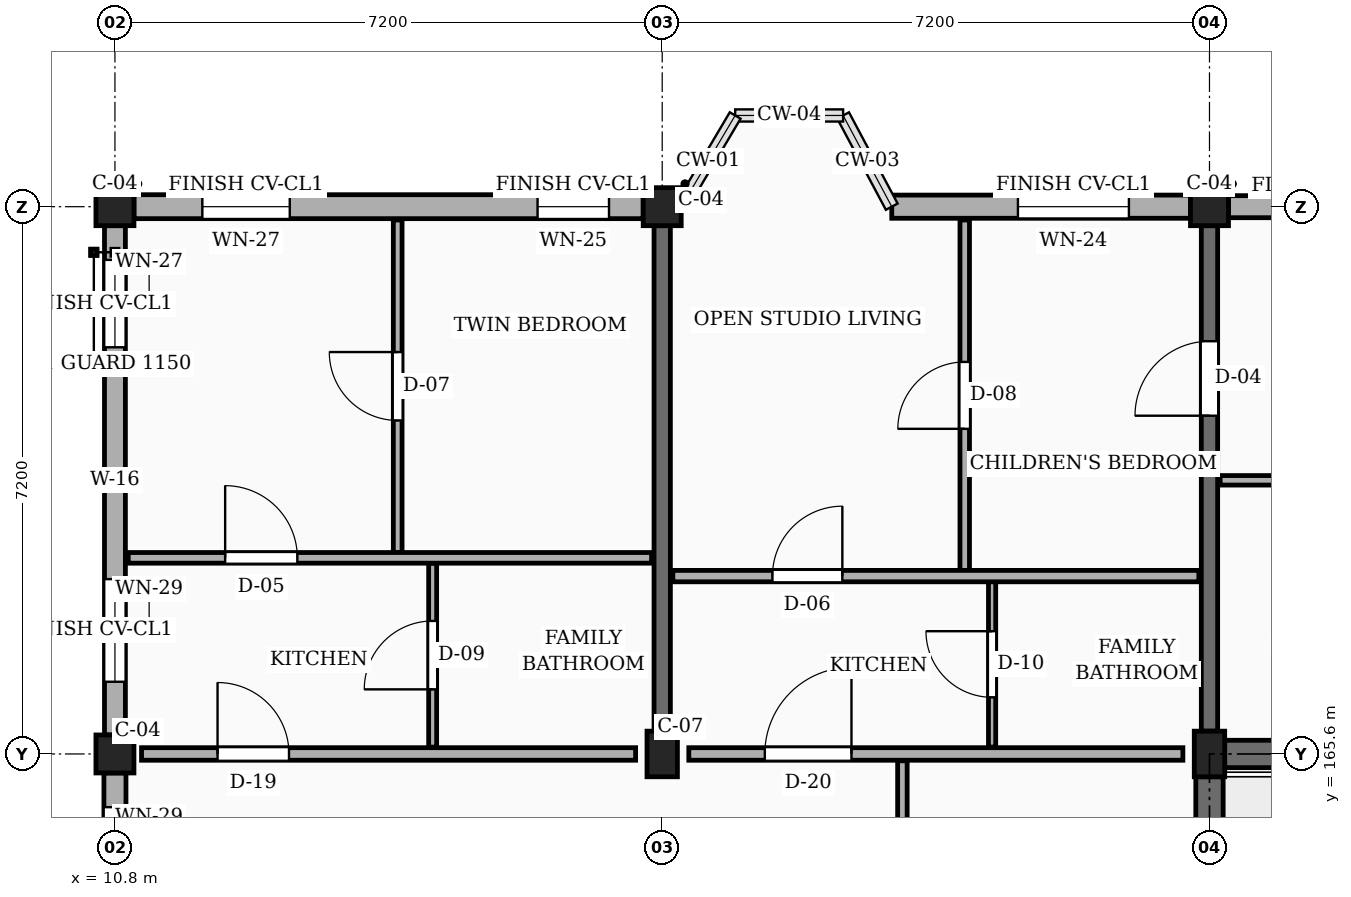
"""IFC4 building model, lengths in metres.
Left out: names, types, materials, properties, quantities, classifications, styles, units other than length and angle.
Written with IfcOpenShell. Run it as: python <this file> out.ifc"""

import sys

from ifc_helpers import new_model, si_unit, direction, frame, frame_2d, origin, origin_2d, place, context, subcontext, project, spatial, rectangle, extrude, element, fill, save


model = new_model("IFC4")
c1 = context("Model", 3, precision=1e-05, world=origin(), true_north=direction((0.0, 1.0)))
c2 = subcontext(c1, "Body", "Model", "MODEL_VIEW")
j1 = project(units=[si_unit("LENGTHUNIT", "METRE"), si_unit("PLANEANGLEUNIT", "RADIAN")], contexts=[c1])
p1 = place(None, origin())
s1 = spatial("IfcSite", under=j1, at=p1, CompositionType="ELEMENT")
p2 = place(p1, origin())
s2 = spatial("IfcBuilding", under=s1, at=p2, CompositionType="ELEMENT")
p3 = place(p2, frame((0.0, 0.0, 26.55)))
s3 = spatial("IfcBuildingStorey", under=s2, at=p3, CompositionType="ELEMENT", Elevation=26.55)
for number, where, z_axis, x_axis in (
    (1, (10.8, 165.6, 0.0), (0.0, 0.0, 1.0), (1.0, 0.0, 0.0)),
    (2, (10.8, 172.8, 0.0), (0.0, 0.0, 1.0), (1.0, 0.0, 0.0)),
):
    element("IfcColumn", number, at=place(p3, frame(where, z_axis=z_axis, x_axis=x_axis)), inside=s3, PredefinedType="COLUMN", context=c2, shape_type="SweptSolid", body=[
        extrude(rectangle(XDim=0.5, YDim=0.5, at=origin_2d()), origin(), (0.0, 0.0, 1.0), 3.15),
    ])
p4 = place(p3, frame((18.0, 165.6, 0.0), z_axis=(0.0, 0.0, 1.0), x_axis=(1.0, 0.0, 0.0)))
e3 = element("IfcColumn", 3, at=p4, inside=s3, PredefinedType="COLUMN", context=c2, shape_type="SweptSolid", body=[
    extrude(rectangle(XDim=0.4, YDim=0.6, at=origin_2d()), origin(), (0.0, 0.0, 1.0), 3.15),
])
p5 = place(p3, frame((18.0, 172.8, 0.0), z_axis=(0.0, 0.0, 1.0), x_axis=(1.0, 0.0, 0.0)))
e4 = element("IfcColumn", 4, at=p5, inside=s3, PredefinedType="COLUMN", context=c2, shape_type="SweptSolid", body=[
    extrude(rectangle(XDim=0.5, YDim=0.5, at=origin_2d()), origin(), (0.0, 0.0, 1.0), 3.15),
])
p6 = place(p3, frame((25.2, 165.6, 0.0), z_axis=(0.0, 0.0, 1.0), x_axis=(1.0, 0.0, 0.0)))
e5 = element("IfcColumn", 5, at=p6, inside=s3, PredefinedType="COLUMN", context=c2, shape_type="SweptSolid", body=[
    extrude(rectangle(XDim=0.4, YDim=0.6, at=origin_2d()), origin(), (0.0, 0.0, 1.0), 3.15),
])
p7 = place(p3, frame((25.2, 172.8, 0.0), z_axis=(0.0, 0.0, 1.0), x_axis=(1.0, 0.0, 0.0)))
e6 = element("IfcColumn", 6, at=p7, inside=s3, PredefinedType="COLUMN", context=c2, shape_type="SweptSolid", body=[
    extrude(rectangle(XDim=0.5, YDim=0.5, at=origin_2d()), origin(), (0.0, 0.0, 1.0), 3.15),
])
p8 = place(p3, frame((18.0, 165.9, 0.0), z_axis=(0.0, 0.0, 1.0), x_axis=(0.0, 1.0, 0.0)))
e7 = element("IfcWall", 7, at=p8, inside=s3, PredefinedType="SOLIDWALL", context=c2, shape_type="SweptSolid", body=[
    extrude(rectangle(XDim=6.65, YDim=0.215, at=frame_2d((3.325, 0.0))), origin(), (0.0, 0.0, 1.0), 2.185),
])
p9 = place(p3, frame((25.2, 165.9, 0.0), z_axis=(0.0, 0.0, 1.0), x_axis=(0.0, 1.0, 0.0)))
e8 = element("IfcWall", 8, at=p9, inside=s3, PredefinedType="SOLIDWALL", context=c2, shape_type="SweptSolid", body=[
    extrude(rectangle(XDim=6.65, YDim=0.215, at=frame_2d((3.325, 0.0))), origin(), (0.0, 0.0, 1.0), 2.185),
])
p10 = place(p9, frame((4.15, 0.0, 0.0)))
e9 = element("IfcOpeningElement", 9, at=p10, cuts=e8, PredefinedType="OPENING", context=c2, shape_type="SweptSolid", body=[
    extrude(rectangle(XDim=0.98, YDim=2.12, at=frame_2d((0.49, 1.06))), frame((0.0, 0.118, 0.0), z_axis=(0.0, -1.0, 0.0), x_axis=(1.0, 0.0, 0.0)), (0.0, 0.0, 1.0), 0.235),
])
p11 = place(p3, frame((32.15, 172.8, 0.0), z_axis=(0.0, 0.0, 1.0), x_axis=(-1.0, 0.0, 0.0)))
e10 = element("IfcWall", 10, at=p11, inside=s3, PredefinedType="SOLIDWALL", context=c2, shape_type="SweptSolid", body=[
    extrude(rectangle(XDim=6.7, YDim=0.29, at=frame_2d((3.35, 0.0))), origin(), (0.0, 0.0, 1.0), 2.455),
])
p12 = place(p11, frame((0.45, 0.0, 0.78)))
e11 = element("IfcOpeningElement", 11, at=p12, cuts=e10, PredefinedType="OPENING", context=c2, shape_type="SweptSolid", body=[
    extrude(rectangle(XDim=1.3, YDim=1.36, at=frame_2d((0.65, 0.68))), frame((0.0, 0.155, 0.0), z_axis=(0.0, -1.0, 0.0), x_axis=(1.0, 0.0, 0.0)), (0.0, 0.0, 1.0), 0.31),
])
p13 = place(p11, frame((4.65, 0.0, 0.78)))
e12 = element("IfcOpeningElement", 12, at=p13, cuts=e10, PredefinedType="OPENING", context=c2, shape_type="SweptSolid", body=[
    extrude(rectangle(XDim=1.46, YDim=1.36, at=frame_2d((0.73, 0.68))), frame((0.0, 0.155, 0.0), z_axis=(0.0, -1.0, 0.0), x_axis=(1.0, 0.0, 0.0)), (0.0, 0.0, 1.0), 0.31),
])
p14 = place(p3, frame((24.95, 172.8, 0.0), z_axis=(0.0, 0.0, 1.0), x_axis=(-1.0, 0.0, 0.0)))
e13 = element("IfcWall", 13, at=p14, inside=s3, PredefinedType="SOLIDWALL", context=c2, shape_type="SweptSolid", body=[
    extrude(rectangle(XDim=3.93, YDim=0.305, at=frame_2d((1.965, 0.0))), origin(), (0.0, 0.0, 1.0), 2.455),
])
p15 = place(p14, frame((0.81, 0.0, 0.78)))
e14 = element("IfcOpeningElement", 14, at=p15, cuts=e13, PredefinedType="OPENING", context=c2, shape_type="SweptSolid", body=[
    extrude(rectangle(XDim=1.46, YDim=1.36, at=frame_2d((0.73, 0.68))), frame((0.0, 0.163, 0.0), z_axis=(0.0, -1.0, 0.0), x_axis=(1.0, 0.0, 0.0)), (0.0, 0.0, 1.0), 0.325),
])
p16 = place(p3, frame((17.75, 172.8, 0.0), z_axis=(0.0, 0.0, 1.0), x_axis=(-1.0, 0.0, 0.0)))
e15 = element("IfcWall", 15, at=p16, inside=s3, PredefinedType="SOLIDWALL", context=c2, shape_type="SweptSolid", body=[
    extrude(rectangle(XDim=6.7, YDim=0.315, at=frame_2d((3.35, 0.0))), origin(), (0.0, 0.0, 1.0), 2.455),
])
p17 = place(p16, frame((0.45, 0.0, 0.78)))
e16 = element("IfcOpeningElement", 16, at=p17, cuts=e15, PredefinedType="OPENING", context=c2, shape_type="SweptSolid", body=[
    extrude(rectangle(XDim=0.94, YDim=1.44, at=frame_2d((0.47, 0.72))), frame((0.0, 0.167, 0.0), z_axis=(0.0, -1.0, 0.0), x_axis=(1.0, 0.0, 0.0)), (0.0, 0.0, 1.0), 0.335),
])
p18 = place(p16, frame((4.65, 0.0, 0.78)))
e17 = element("IfcOpeningElement", 17, at=p18, cuts=e15, PredefinedType="OPENING", context=c2, shape_type="SweptSolid", body=[
    extrude(rectangle(XDim=1.15, YDim=1.44, at=frame_2d((0.575, 0.72))), frame((0.0, 0.167, 0.0), z_axis=(0.0, -1.0, 0.0), x_axis=(1.0, 0.0, 0.0)), (0.0, 0.0, 1.0), 0.335),
])
p19 = place(p3, frame((10.8, 172.55, 0.0), z_axis=(0.0, 0.0, 1.0), x_axis=(0.0, -1.0, 0.0)))
e18 = element("IfcWall", 18, at=p19, inside=s3, PredefinedType="SOLIDWALL", context=c2, shape_type="SweptSolid", body=[
    extrude(rectangle(XDim=6.7, YDim=0.275, at=frame_2d((3.35, 0.0))), origin(), (0.0, 0.0, 1.0), 2.455),
])
p20 = place(p19, frame((0.45, 0.0, 0.78)))
e19 = element("IfcOpeningElement", 19, at=p20, cuts=e18, PredefinedType="OPENING", context=c2, shape_type="SweptSolid", body=[
    extrude(rectangle(XDim=1.15, YDim=1.44, at=frame_2d((0.575, 0.72))), frame((0.0, 0.147, 0.0), z_axis=(0.0, -1.0, 0.0), x_axis=(1.0, 0.0, 0.0)), (0.0, 0.0, 1.0), 0.295),
])
p21 = place(p19, frame((4.65, 0.0, 0.78)))
e20 = element("IfcOpeningElement", 20, at=p21, cuts=e18, PredefinedType="OPENING", context=c2, shape_type="SweptSolid", body=[
    extrude(rectangle(XDim=1.35, YDim=1.44, at=frame_2d((0.675, 0.72))), frame((0.0, 0.147, 0.0), z_axis=(0.0, -1.0, 0.0), x_axis=(1.0, 0.0, 0.0)), (0.0, 0.0, 1.0), 0.295),
])
p22 = place(p3, frame((10.8, 165.35, 0.0), z_axis=(0.0, 0.0, 1.0), x_axis=(0.0, -1.0, 0.0)))
e21 = element("IfcWall", 21, at=p22, inside=s3, PredefinedType="SOLIDWALL", context=c2, shape_type="SweptSolid", body=[
    extrude(rectangle(XDim=6.7, YDim=0.29, at=frame_2d((3.35, 0.0))), origin(), (0.0, 0.0, 1.0), 2.455),
])
p23 = place(p22, frame((0.45, 0.0, 0.78)))
e22 = element("IfcOpeningElement", 22, at=p23, cuts=e21, PredefinedType="OPENING", context=c2, shape_type="SweptSolid", body=[
    extrude(rectangle(XDim=1.35, YDim=1.44, at=frame_2d((0.675, 0.72))), frame((0.0, 0.155, 0.0), z_axis=(0.0, -1.0, 0.0), x_axis=(1.0, 0.0, 0.0)), (0.0, 0.0, 1.0), 0.31),
])
p24 = place(p22, frame((4.65, 0.0, 0.78)))
e23 = element("IfcOpeningElement", 23, at=p24, cuts=e21, PredefinedType="OPENING", context=c2, shape_type="SweptSolid", body=[
    extrude(rectangle(XDim=0.85, YDim=1.15, at=frame_2d((0.425, 0.575))), frame((0.0, 0.155, 0.0), z_axis=(0.0, -1.0, 0.0), x_axis=(1.0, 0.0, 0.0)), (0.0, 0.0, 1.0), 0.31),
])
p25 = place(p3, frame((25.2, 158.7, 0.0), z_axis=(0.0, 0.0, 1.0), x_axis=(0.0, 1.0, 0.0)))
e24 = element("IfcWall", 24, at=p25, inside=s3, PredefinedType="SHEAR", context=c2, shape_type="SweptSolid", body=[
    extrude(rectangle(XDim=6.6, YDim=0.36, at=frame_2d((3.3, 0.0))), origin(), (0.0, 0.0, 1.0), 2.885),
])
p26 = place(p3, frame((25.4, 165.6, 0.0), z_axis=(0.0, 0.0, 1.0), x_axis=(1.0, 0.0, 0.0)))
e25 = element("IfcWall", 25, at=p26, inside=s3, PredefinedType="SHEAR", context=c2, shape_type="SweptSolid", body=[
    extrude(rectangle(XDim=6.8, YDim=0.36, at=frame_2d((3.4, 0.0))), origin(), (0.0, 0.0, 1.0), 2.885),
])
p27 = place(p3, frame((11.15, 165.6, 0.0), z_axis=(0.0, 0.0, 1.0), x_axis=(1.0, 0.0, 0.0)))
e26 = element("IfcWall", 26, at=p27, inside=s3, PredefinedType="PARTITIONING", context=c2, shape_type="SweptSolid", body=[
    extrude(rectangle(XDim=6.5, YDim=0.165, at=frame_2d((3.25, 0.0))), origin(), (0.0, 0.0, 1.0), 2.32),
])
p28 = place(p27, frame((1.0, 0.0, 0.0)))
e27 = element("IfcOpeningElement", 27, at=p28, cuts=e26, PredefinedType="OPENING", context=c2, shape_type="SweptSolid", body=[
    extrude(rectangle(XDim=0.94, YDim=2.12, at=frame_2d((0.47, 1.06))), frame((0.0, 0.093, 0.0), z_axis=(0.0, -1.0, 0.0), x_axis=(1.0, 0.0, 0.0)), (0.0, 0.0, 1.0), 0.185),
])
p29 = place(p3, frame((18.35, 165.6, 0.0), z_axis=(0.0, 0.0, 1.0), x_axis=(1.0, 0.0, 0.0)))
e28 = element("IfcWall", 28, at=p29, inside=s3, PredefinedType="PARTITIONING", context=c2, shape_type="SweptSolid", body=[
    extrude(rectangle(XDim=6.5, YDim=0.165, at=frame_2d((3.25, 0.0))), origin(), (0.0, 0.0, 1.0), 2.32),
])
p30 = place(p29, frame((1.0, 0.0, 0.0)))
e29 = element("IfcOpeningElement", 29, at=p30, cuts=e28, PredefinedType="OPENING", context=c2, shape_type="SweptSolid", body=[
    extrude(rectangle(XDim=1.14, YDim=2.18, at=frame_2d((0.57, 1.09))), frame((0.0, 0.093, 0.0), z_axis=(0.0, -1.0, 0.0), x_axis=(1.0, 0.0, 0.0)), (0.0, 0.0, 1.0), 0.185),
])
p31 = place(p3, frame((14.52, 168.25, 0.0), z_axis=(0.0, 0.0, 1.0), x_axis=(0.0, 1.0, 0.0)))
e30 = element("IfcWall", 30, at=p31, inside=s3, PredefinedType="PARTITIONING", context=c2, shape_type="SweptSolid", body=[
    extrude(rectangle(XDim=4.375, YDim=0.115, at=frame_2d((2.188, 0.0))), origin(), (0.0, 0.0, 1.0), 2.32),
])
p32 = place(p31, frame((1.738, 0.0, 0.0)))
e31 = element("IfcOpeningElement", 31, at=p32, cuts=e30, PredefinedType="OPENING", context=c2, shape_type="SweptSolid", body=[
    extrude(rectangle(XDim=0.9, YDim=2.1, at=frame_2d((0.45, 1.05))), frame((0.0, 0.067, 0.0), z_axis=(0.0, -1.0, 0.0), x_axis=(1.0, 0.0, 0.0)), (0.0, 0.0, 1.0), 0.135),
])
p33 = place(p3, frame((14.98, 165.69, 0.0), z_axis=(0.0, 0.0, 1.0), x_axis=(0.0, 1.0, 0.0)))
e32 = element("IfcWall", 32, at=p33, inside=s3, PredefinedType="PARTITIONING", context=c2, shape_type="SweptSolid", body=[
    extrude(rectangle(XDim=2.42, YDim=0.105, at=frame_2d((1.21, 0.0))), origin(), (0.0, 0.0, 1.0), 2.32),
])
p34 = place(p33, frame((0.76, 0.0, 0.0)))
e33 = element("IfcOpeningElement", 33, at=p34, cuts=e32, PredefinedType="OPENING", context=c2, shape_type="SweptSolid", body=[
    extrude(rectangle(XDim=0.9, YDim=2.05, at=frame_2d((0.45, 1.025))), frame((0.0, 0.062, 0.0), z_axis=(0.0, -1.0, 0.0), x_axis=(1.0, 0.0, 0.0)), (0.0, 0.0, 1.0), 0.125),
])
p35 = place(p3, frame((10.975, 168.18, 0.0), z_axis=(0.0, 0.0, 1.0), x_axis=(1.0, 0.0, 0.0)))
e34 = element("IfcWall", 34, at=p35, inside=s3, PredefinedType="PARTITIONING", context=c2, shape_type="SweptSolid", body=[
    extrude(rectangle(XDim=6.885, YDim=0.14, at=frame_2d((3.442, 0.0))), origin(), (0.0, 0.0, 1.0), 2.32),
])
p36 = place(p35, frame((1.275, 0.0, 0.0)))
e35 = element("IfcOpeningElement", 35, at=p36, cuts=e34, PredefinedType="OPENING", context=c2, shape_type="SweptSolid", body=[
    extrude(rectangle(XDim=0.95, YDim=2.1, at=frame_2d((0.475, 1.05))), frame((0.0, 0.08, 0.0), z_axis=(0.0, -1.0, 0.0), x_axis=(1.0, 0.0, 0.0)), (0.0, 0.0, 1.0), 0.16),
])
p37 = place(p3, frame((21.16, 158.49, 0.0), z_axis=(0.0, 0.0, 1.0), x_axis=(0.0, 1.0, 0.0)))
e36 = element("IfcWall", 36, at=p37, inside=s3, PredefinedType="PARTITIONING", context=c2, shape_type="SweptSolid", body=[
    extrude(rectangle(XDim=7.02, YDim=0.125, at=frame_2d((3.51, 0.0))), origin(), (0.0, 0.0, 1.0), 2.32),
])
p38 = place(p37, frame((2.85, 0.0, 0.0)))
e37 = element("IfcOpeningElement", 37, at=p38, cuts=e36, PredefinedType="OPENING", context=c2, shape_type="SweptSolid", body=[
    extrude(rectangle(XDim=1.02, YDim=2.15, at=frame_2d((0.51, 1.075))), frame((0.0, 0.073, 0.0), z_axis=(0.0, -1.0, 0.0), x_axis=(1.0, 0.0, 0.0)), (0.0, 0.0, 1.0), 0.145),
])
p39 = place(p3, frame((21.98, 168.01, 0.0), z_axis=(0.0, 0.0, 1.0), x_axis=(0.0, 1.0, 0.0)))
e38 = element("IfcWall", 38, at=p39, inside=s3, PredefinedType="PARTITIONING", context=c2, shape_type="SweptSolid", body=[
    extrude(rectangle(XDim=4.615, YDim=0.125, at=frame_2d((2.308, 0.0))), origin(), (0.0, 0.0, 1.0), 2.32),
])
p40 = place(p39, frame((1.867, 0.0, 0.0)))
e39 = element("IfcOpeningElement", 39, at=p40, cuts=e38, PredefinedType="OPENING", context=c2, shape_type="SweptSolid", body=[
    extrude(rectangle(XDim=0.88, YDim=2.08, at=frame_2d((0.44, 1.04))), frame((0.0, 0.073, 0.0), z_axis=(0.0, -1.0, 0.0), x_axis=(1.0, 0.0, 0.0)), (0.0, 0.0, 1.0), 0.145),
])
p41 = place(p3, frame((22.34, 165.69, 0.0), z_axis=(0.0, 0.0, 1.0), x_axis=(0.0, 1.0, 0.0)))
e40 = element("IfcWall", 40, at=p41, inside=s3, PredefinedType="PARTITIONING", context=c2, shape_type="SweptSolid", body=[
    extrude(rectangle(XDim=2.18, YDim=0.095, at=frame_2d((1.09, 0.0))), origin(), (0.0, 0.0, 1.0), 2.32),
])
p42 = place(p41, frame((0.655, 0.0, 0.0)))
e41 = element("IfcOpeningElement", 41, at=p42, cuts=e40, PredefinedType="OPENING", context=c2, shape_type="SweptSolid", body=[
    extrude(rectangle(XDim=0.87, YDim=2.05, at=frame_2d((0.435, 1.025))), frame((0.0, 0.058, 0.0), z_axis=(0.0, -1.0, 0.0), x_axis=(1.0, 0.0, 0.0)), (0.0, 0.0, 1.0), 0.115),
])
p43 = place(p3, frame((18.14, 167.94, 0.0), z_axis=(0.0, 0.0, 1.0), x_axis=(1.0, 0.0, 0.0)))
e42 = element("IfcWall", 42, at=p43, inside=s3, PredefinedType="PARTITIONING", context=c2, shape_type="SweptSolid", body=[
    extrude(rectangle(XDim=6.92, YDim=0.15, at=frame_2d((3.46, 0.0))), origin(), (0.0, 0.0, 1.0), 2.32),
])
p44 = place(p43, frame((1.31, 0.0, 0.0)))
e43 = element("IfcOpeningElement", 43, at=p44, cuts=e42, PredefinedType="OPENING", context=c2, shape_type="SweptSolid", body=[
    extrude(rectangle(XDim=0.92, YDim=2.1, at=frame_2d((0.46, 1.05))), frame((0.0, 0.085, 0.0), z_axis=(0.0, -1.0, 0.0), x_axis=(1.0, 0.0, 0.0)), (0.0, 0.0, 1.0), 0.17),
])
p45 = place(p3, frame((25.34, 169.2, 0.0), z_axis=(0.0, 0.0, 1.0), x_axis=(1.0, 0.0, 0.0)))
e44 = element("IfcWall", 44, at=p45, inside=s3, PredefinedType="PARTITIONING", context=c2, shape_type="SweptSolid", body=[
    extrude(rectangle(XDim=6.92, YDim=0.125, at=frame_2d((3.46, 0.0))), origin(), (0.0, 0.0, 1.0), 2.32),
])
p46 = place(p45, frame((1.05, 0.0, 0.0)))
e45 = element("IfcOpeningElement", 45, at=p46, cuts=e44, PredefinedType="OPENING", context=c2, shape_type="SweptSolid", body=[
    extrude(rectangle(XDim=0.87, YDim=2.05, at=frame_2d((0.435, 1.025))), frame((0.0, 0.073, 0.0), z_axis=(0.0, -1.0, 0.0), x_axis=(1.0, 0.0, 0.0)), (0.0, 0.0, 1.0), 0.145),
])
p47 = place(p45, frame((4.45, 0.0, 0.0)))
e46 = element("IfcOpeningElement", 46, at=p47, cuts=e44, PredefinedType="OPENING", context=c2, shape_type="SweptSolid", body=[
    extrude(rectangle(XDim=0.88, YDim=2.08, at=frame_2d((0.44, 1.04))), frame((0.0, 0.073, 0.0), z_axis=(0.0, -1.0, 0.0), x_axis=(1.0, 0.0, 0.0)), (0.0, 0.0, 1.0), 0.145),
])
p48 = place(p15, origin())
e47 = element("IfcWindow", 47, at=p48, inside=s3, PartitioningType="SINGLE_PANEL", PredefinedType="WINDOW", context=c2, shape_type="SweptSolid", body=[
    extrude(rectangle(XDim=1.46, YDim=1.36, at=frame_2d((0.73, 0.68))), frame((0.0, 0.03, 0.0), z_axis=(0.0, -1.0, 0.0), x_axis=(1.0, 0.0, 0.0)), (0.0, 0.0, 1.0), 0.06),
])
fill(e14, e47)
p49 = place(p17, origin())
e48 = element("IfcWindow", 48, at=p49, inside=s3, PartitioningType="SINGLE_PANEL", PredefinedType="WINDOW", context=c2, shape_type="SweptSolid", body=[
    extrude(rectangle(XDim=0.94, YDim=1.44, at=frame_2d((0.47, 0.72))), frame((0.0, 0.03, 0.0), z_axis=(0.0, -1.0, 0.0), x_axis=(1.0, 0.0, 0.0)), (0.0, 0.0, 1.0), 0.06),
])
fill(e16, e48)
p50 = place(p18, origin())
e49 = element("IfcWindow", 49, at=p50, inside=s3, PartitioningType="SINGLE_PANEL", PredefinedType="WINDOW", context=c2, shape_type="SweptSolid", body=[
    extrude(rectangle(XDim=1.15, YDim=1.44, at=frame_2d((0.575, 0.72))), frame((0.0, 0.03, 0.0), z_axis=(0.0, -1.0, 0.0), x_axis=(1.0, 0.0, 0.0)), (0.0, 0.0, 1.0), 0.06),
])
fill(e17, e49)
p51 = place(p20, origin())
e50 = element("IfcWindow", 50, at=p51, inside=s3, PartitioningType="SINGLE_PANEL", PredefinedType="WINDOW", context=c2, shape_type="SweptSolid", body=[
    extrude(rectangle(XDim=1.15, YDim=1.44, at=frame_2d((0.575, 0.72))), frame((0.0, 0.03, 0.0), z_axis=(0.0, -1.0, 0.0), x_axis=(1.0, 0.0, 0.0)), (0.0, 0.0, 1.0), 0.06),
])
fill(e19, e50)
p52 = place(p21, origin())
e51 = element("IfcWindow", 51, at=p52, inside=s3, PartitioningType="SINGLE_PANEL", PredefinedType="WINDOW", context=c2, shape_type="SweptSolid", body=[
    extrude(rectangle(XDim=1.35, YDim=1.44, at=frame_2d((0.675, 0.72))), frame((0.0, 0.03, 0.0), z_axis=(0.0, -1.0, 0.0), x_axis=(1.0, 0.0, 0.0)), (0.0, 0.0, 1.0), 0.06),
])
fill(e20, e51)
p53 = place(p23, origin())
e52 = element("IfcWindow", 52, at=p53, inside=s3, PartitioningType="SINGLE_PANEL", PredefinedType="WINDOW", context=c2, shape_type="SweptSolid", body=[
    extrude(rectangle(XDim=1.35, YDim=1.44, at=frame_2d((0.675, 0.72))), frame((0.0, 0.03, 0.0), z_axis=(0.0, -1.0, 0.0), x_axis=(1.0, 0.0, 0.0)), (0.0, 0.0, 1.0), 0.06),
])
fill(e22, e52)
p54 = place(p28, origin())
e53 = element("IfcDoor", 53, at=p54, inside=s3, OperationType="SINGLE_SWING_LEFT", PredefinedType="DOOR", context=c2, shape_type="SweptSolid", body=[
    extrude(rectangle(XDim=0.94, YDim=2.12, at=frame_2d((0.47, 1.06))), frame((0.0, 0.025, 0.0), z_axis=(0.0, -1.0, 0.0), x_axis=(1.0, 0.0, 0.0)), (0.0, 0.0, 1.0), 0.05),
])
fill(e27, e53)
p55 = place(p30, origin())
e54 = element("IfcDoor", 54, at=p55, inside=s3, OperationType="SINGLE_SWING_RIGHT", PredefinedType="DOOR", context=c2, shape_type="SweptSolid", body=[
    extrude(rectangle(XDim=1.14, YDim=2.18, at=frame_2d((0.57, 1.09))), frame((0.0, 0.025, 0.0), z_axis=(0.0, -1.0, 0.0), x_axis=(1.0, 0.0, 0.0)), (0.0, 0.0, 1.0), 0.05),
])
fill(e29, e54)
p56 = place(p32, origin())
e55 = element("IfcDoor", 55, at=p56, inside=s3, OperationType="SINGLE_SWING_RIGHT", PredefinedType="DOOR", context=c2, shape_type="SweptSolid", body=[
    extrude(rectangle(XDim=0.9, YDim=2.1, at=frame_2d((0.45, 1.05))), frame((0.0, 0.025, 0.0), z_axis=(0.0, -1.0, 0.0), x_axis=(1.0, 0.0, 0.0)), (0.0, 0.0, 1.0), 0.05),
])
fill(e31, e55)
p57 = place(p34, origin())
e56 = element("IfcDoor", 56, at=p57, inside=s3, OperationType="SINGLE_SWING_LEFT", PredefinedType="DOOR", context=c2, shape_type="SweptSolid", body=[
    extrude(rectangle(XDim=0.9, YDim=2.05, at=frame_2d((0.45, 1.025))), frame((0.0, 0.025, 0.0), z_axis=(0.0, -1.0, 0.0), x_axis=(1.0, 0.0, 0.0)), (0.0, 0.0, 1.0), 0.05),
])
fill(e33, e56)
p58 = place(p36, origin())
e57 = element("IfcDoor", 57, at=p58, inside=s3, OperationType="SINGLE_SWING_LEFT", PredefinedType="DOOR", context=c2, shape_type="SweptSolid", body=[
    extrude(rectangle(XDim=0.95, YDim=2.1, at=frame_2d((0.475, 1.05))), frame((0.0, 0.025, 0.0), z_axis=(0.0, -1.0, 0.0), x_axis=(1.0, 0.0, 0.0)), (0.0, 0.0, 1.0), 0.05),
])
fill(e35, e57)
p59 = place(p40, origin())
e58 = element("IfcDoor", 58, at=p59, inside=s3, OperationType="SINGLE_SWING_LEFT", PredefinedType="DOOR", context=c2, shape_type="SweptSolid", body=[
    extrude(rectangle(XDim=0.88, YDim=2.08, at=frame_2d((0.44, 1.04))), frame((0.0, 0.025, 0.0), z_axis=(0.0, -1.0, 0.0), x_axis=(1.0, 0.0, 0.0)), (0.0, 0.0, 1.0), 0.05),
])
fill(e39, e58)
p60 = place(p42, origin())
e59 = element("IfcDoor", 59, at=p60, inside=s3, OperationType="SINGLE_SWING_RIGHT", PredefinedType="DOOR", context=c2, shape_type="SweptSolid", body=[
    extrude(rectangle(XDim=0.87, YDim=2.05, at=frame_2d((0.435, 1.025))), frame((0.0, 0.025, 0.0), z_axis=(0.0, -1.0, 0.0), x_axis=(1.0, 0.0, 0.0)), (0.0, 0.0, 1.0), 0.05),
])
fill(e41, e59)
p61 = place(p44, origin())
e60 = element("IfcDoor", 60, at=p61, inside=s3, OperationType="SINGLE_SWING_RIGHT", PredefinedType="DOOR", context=c2, shape_type="SweptSolid", body=[
    extrude(rectangle(XDim=0.92, YDim=2.1, at=frame_2d((0.46, 1.05))), frame((0.0, 0.025, 0.0), z_axis=(0.0, -1.0, 0.0), x_axis=(1.0, 0.0, 0.0)), (0.0, 0.0, 1.0), 0.05),
])
fill(e43, e60)
p62 = place(p10, origin())
e61 = element("IfcDoor", 61, at=p62, inside=s3, OperationType="SINGLE_SWING_LEFT", PredefinedType="DOOR", context=c2, shape_type="SweptSolid", body=[
    extrude(rectangle(XDim=0.98, YDim=2.12, at=frame_2d((0.49, 1.06))), frame((0.0, 0.025, 0.0), z_axis=(0.0, -1.0, 0.0), x_axis=(1.0, 0.0, 0.0)), (0.0, 0.0, 1.0), 0.05),
])
fill(e9, e61)
save(model, sys.argv[1])
